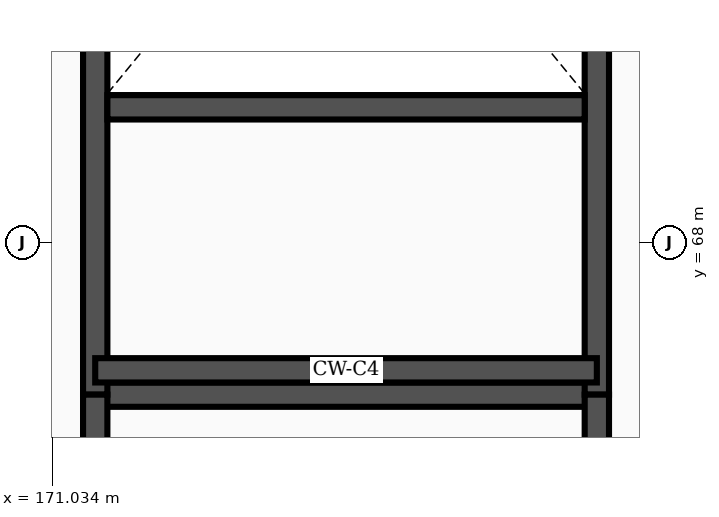
"""IFC4 building model, lengths in metres.
Left out: names, types, materials, properties, quantities, classifications, styles, units other than length and angle.
Written with IfcOpenShell. Run it as: python <this file> out.ifc"""

import sys

from ifc_helpers import new_model, si_unit, direction, frame, frame_2d, origin, place, context, subcontext, project, spatial, rectangle, extrude, element, save


model = new_model("IFC4")
c1 = context("Model", 3, precision=1e-05, world=origin(), true_north=direction((0.0, 1.0)))
c2 = subcontext(c1, "Body", "Model", "MODEL_VIEW")
j1 = project(units=[si_unit("LENGTHUNIT", "METRE"), si_unit("PLANEANGLEUNIT", "RADIAN")], contexts=[c1])
p1 = place(None, origin())
s1 = spatial("IfcSite", under=j1, at=p1, CompositionType="ELEMENT")
p2 = place(p1, origin())
s2 = spatial("IfcBuilding", under=s1, at=p2, CompositionType="ELEMENT")
p3 = place(p2, frame((0.0, 0.0, 16.8)))
s3 = spatial("IfcBuildingStorey", under=s2, at=p3, CompositionType="ELEMENT", Elevation=16.8)
p4 = place(p3, frame((171.6, 66.0, 0.0), z_axis=(0.0, 0.0, 1.0), x_axis=(1.0, 0.0, 0.0)))
e1 = element("IfcWall", 1, at=p4, inside=s3, PredefinedType="SHEAR", context=c2, shape_type="SweptSolid", body=[
    extrude(rectangle(XDim=6.6, YDim=0.32, at=frame_2d((3.3, 0.0))), origin(), (0.0, 0.0, 1.0), 4.555),
])
p5 = place(p3, frame((171.6, 66.0, 0.0), z_axis=(0.0, 0.0, 1.0), x_axis=(0.0, 1.0, 0.0)))
e2 = element("IfcWall", 2, at=p5, inside=s3, PredefinedType="SHEAR", context=c2, shape_type="SweptSolid", body=[
    extrude(rectangle(XDim=14.6, YDim=0.32, at=frame_2d((7.3, 0.0))), origin(), (0.0, 0.0, 1.0), 4.555),
])
p6 = place(p3, frame((178.2, 66.0, 0.0), z_axis=(0.0, 0.0, 1.0), x_axis=(0.0, 1.0, 0.0)))
e3 = element("IfcWall", 3, at=p6, inside=s3, PredefinedType="SHEAR", context=c2, shape_type="SweptSolid", body=[
    extrude(rectangle(XDim=14.6, YDim=0.32, at=frame_2d((7.3, 0.0))), origin(), (0.0, 0.0, 1.0), 4.555),
])
p7 = place(p6, frame((11.65, 0.0, 0.0)))
e4 = element("IfcOpeningElement", 4, at=p7, cuts=e3, PredefinedType="OPENING", context=c2, shape_type="SweptSolid", body=[
    extrude(rectangle(XDim=2.4, YDim=2.25, at=frame_2d((1.2, 1.125))), frame((0.0, 0.172, 0.0), z_axis=(0.0, -1.0, 0.0), x_axis=(1.0, 0.0, 0.0)), (0.0, 0.0, 1.0), 0.344),
])
p8 = place(p3, frame((171.76, 69.78, 0.0), z_axis=(0.0, 0.0, 1.0), x_axis=(1.0, 0.0, 0.0)))
e5 = element("IfcWall", 5, at=p8, inside=s3, PredefinedType="SHEAR", context=c2, shape_type="SweptSolid", body=[
    extrude(rectangle(XDim=6.28, YDim=0.32, at=frame_2d((3.14, 0.0))), origin(), (0.0, 0.0, 1.0), 4.555),
])
p9 = place(p3, frame((171.6, 66.32, 0.0), z_axis=(0.0, 0.0, 1.0), x_axis=(1.0, 0.0, 0.0)))
e6 = element("IfcWall", 6, at=p9, inside=s3, PredefinedType="SHEAR", context=c2, shape_type="SweptSolid", body=[
    extrude(rectangle(XDim=6.6, YDim=0.32, at=frame_2d((3.3, 0.0))), origin(), (0.0, 0.0, 1.0), 4.555),
])
p10 = place(p3, frame((171.6, 54.0, 0.0), z_axis=(0.0, 0.0, 1.0), x_axis=(0.0, 1.0, 0.0)))
e7 = element("IfcWall", 7, at=p10, inside=s3, PredefinedType="SHEAR", context=c2, shape_type="SweptSolid", body=[
    extrude(rectangle(XDim=12.0, YDim=0.32, at=frame_2d((6.0, 0.0))), origin(), (0.0, 0.0, 1.0), 4.555),
])
p11 = place(p3, frame((178.2, 54.0, 0.0), z_axis=(0.0, 0.0, 1.0), x_axis=(0.0, 1.0, 0.0)))
e8 = element("IfcWall", 8, at=p11, inside=s3, PredefinedType="SHEAR", context=c2, shape_type="SweptSolid", body=[
    extrude(rectangle(XDim=12.0, YDim=0.32, at=frame_2d((6.0, 0.0))), origin(), (0.0, 0.0, 1.0), 4.555),
])
p12 = place(p11, frame((0.55, 0.0, 0.0)))
e9 = element("IfcOpeningElement", 9, at=p12, cuts=e8, PredefinedType="OPENING", context=c2, shape_type="SweptSolid", body=[
    extrude(rectangle(XDim=2.4, YDim=2.25, at=frame_2d((1.2, 1.125))), frame((0.0, 0.172, 0.0), z_axis=(0.0, -1.0, 0.0), x_axis=(1.0, 0.0, 0.0)), (0.0, 0.0, 1.0), 0.344),
])
save(model, sys.argv[1])
